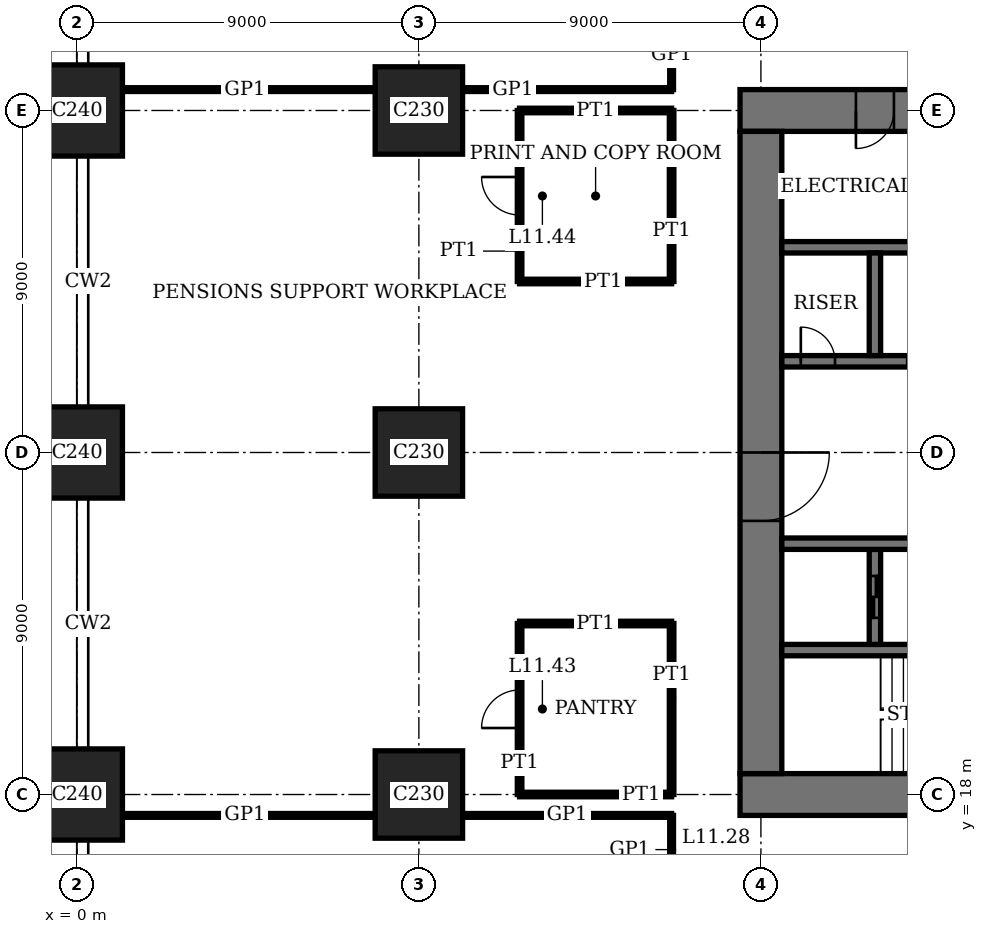
"""IFC4 building model, lengths in metres.
Left out: names, types, materials, properties, quantities, classifications, styles, units other than length and angle.
Written with IfcOpenShell. Run it as: python <this file> out.ifc"""

import sys

from ifc_helpers import new_model, si_unit, direction, frame, frame_2d, origin, origin_2d, place, context, subcontext, project, spatial, rectangle, extrude, element, fill, save


model = new_model("IFC4")
c1 = context("Model", 3, precision=1e-05, world=origin(), true_north=direction((0.0, 1.0)))
c2 = subcontext(c1, "Body", "Model", "MODEL_VIEW")
j1 = project(units=[si_unit("LENGTHUNIT", "METRE"), si_unit("PLANEANGLEUNIT", "RADIAN")], contexts=[c1])
p1 = place(None, origin())
s1 = spatial("IfcSite", under=j1, at=p1, CompositionType="ELEMENT")
p2 = place(p1, origin())
s2 = spatial("IfcBuilding", under=s1, at=p2, CompositionType="ELEMENT")
p3 = place(p2, frame((0.0, 0.0, 47.8)))
s3 = spatial("IfcBuildingStorey", under=s2, at=p3, CompositionType="ELEMENT", Elevation=47.8)
for number, where, z_axis, x_axis in (
    (1, (0.0, 18.0, 0.0), (0.0, 0.0, 1.0), (1.0, 0.0, 0.0)),
    (2, (0.0, 27.0, 0.0), (0.0, 0.0, 1.0), (1.0, 0.0, 0.0)),
    (3, (0.0, 36.0, 0.0), (0.0, 0.0, 1.0), (1.0, 0.0, 0.0)),
):
    element("IfcColumn", number, at=place(p3, frame(where, z_axis=z_axis, x_axis=x_axis)), inside=s3, PredefinedType="COLUMN", context=c2, shape_type="SweptSolid", body=[
        extrude(rectangle(XDim=2.4, YDim=2.4, at=origin_2d()), origin(), (0.0, 0.0, 1.0), 4.0),
    ])
for number, where, z_axis, x_axis in (
    (4, (9.0, 18.0, 0.0), (0.0, 0.0, 1.0), (1.0, 0.0, 0.0)),
    (5, (9.0, 27.0, 0.0), (0.0, 0.0, 1.0), (1.0, 0.0, 0.0)),
    (6, (9.0, 36.0, 0.0), (0.0, 0.0, 1.0), (1.0, 0.0, 0.0)),
):
    element("IfcColumn", number, at=place(p3, frame(where, z_axis=z_axis, x_axis=x_axis)), inside=s3, PredefinedType="COLUMN", context=c2, shape_type="SweptSolid", body=[
        extrude(rectangle(XDim=2.3, YDim=2.3, at=origin_2d()), origin(), (0.0, 0.0, 1.0), 4.0),
    ])
p4 = place(p3, frame((17.45, 18.0, 0.0), z_axis=(0.0, 0.0, 1.0), x_axis=(1.0, 0.0, 0.0)))
e7 = element("IfcWall", 7, at=p4, inside=s3, PredefinedType="SHEAR", context=c2, shape_type="SweptSolid", body=[
    extrude(rectangle(XDim=28.1, YDim=1.1, at=frame_2d((14.05, 0.0))), origin(), (0.0, 0.0, 1.0), 4.0),
])
p5 = place(p4, frame((11.55, 0.0, 0.0)))
e8 = element("IfcOpeningElement", 8, at=p5, cuts=e7, PredefinedType="OPENING", context=c2, shape_type="SweptSolid", body=[
    extrude(rectangle(XDim=1.0, YDim=2.4, at=frame_2d((0.5, 1.2))), frame((0.0, 0.56, 0.0), z_axis=(0.0, -1.0, 0.0), x_axis=(1.0, 0.0, 0.0)), (0.0, 0.0, 1.0), 1.12),
])
p6 = place(p4, frame((16.55, 0.0, 0.0)))
e9 = element("IfcOpeningElement", 9, at=p6, cuts=e7, PredefinedType="OPENING", context=c2, shape_type="SweptSolid", body=[
    extrude(rectangle(XDim=1.0, YDim=2.4, at=frame_2d((0.5, 1.2))), frame((0.0, 0.56, 0.0), z_axis=(0.0, -1.0, 0.0), x_axis=(1.0, 0.0, 0.0)), (0.0, 0.0, 1.0), 1.12),
])
p7 = place(p4, frame((20.0, 0.0, 0.0)))
e10 = element("IfcOpeningElement", 10, at=p7, cuts=e7, PredefinedType="OPENING", context=c2, shape_type="SweptSolid", body=[
    extrude(rectangle(XDim=1.1, YDim=2.4, at=frame_2d((0.55, 1.2))), frame((0.0, 0.56, 0.0), z_axis=(0.0, -1.0, 0.0), x_axis=(1.0, 0.0, 0.0)), (0.0, 0.0, 1.0), 1.12),
])
p8 = place(p4, frame((24.05, 0.0, 0.0)))
e11 = element("IfcOpeningElement", 11, at=p8, cuts=e7, PredefinedType="OPENING", context=c2, shape_type="SweptSolid", body=[
    extrude(rectangle(XDim=1.0, YDim=2.4, at=frame_2d((0.5, 1.2))), frame((0.0, 0.56, 0.0), z_axis=(0.0, -1.0, 0.0), x_axis=(1.0, 0.0, 0.0)), (0.0, 0.0, 1.0), 1.12),
])
p9 = place(p3, frame((45.55, 36.0, 0.0), z_axis=(0.0, 0.0, 1.0), x_axis=(-1.0, 0.0, 0.0)))
e12 = element("IfcWall", 12, at=p9, inside=s3, PredefinedType="SHEAR", context=c2, shape_type="SweptSolid", body=[
    extrude(rectangle(XDim=28.1, YDim=1.1, at=frame_2d((14.05, 0.0))), origin(), (0.0, 0.0, 1.0), 4.0),
])
p10 = place(p9, frame((11.55, 0.0, 0.0)))
e13 = element("IfcOpeningElement", 13, at=p10, cuts=e12, PredefinedType="OPENING", context=c2, shape_type="SweptSolid", body=[
    extrude(rectangle(XDim=1.0, YDim=2.4, at=frame_2d((0.5, 1.2))), frame((0.0, 0.56, 0.0), z_axis=(0.0, -1.0, 0.0), x_axis=(1.0, 0.0, 0.0)), (0.0, 0.0, 1.0), 1.12),
])
p11 = place(p9, frame((16.55, 0.0, 0.0)))
e14 = element("IfcOpeningElement", 14, at=p11, cuts=e12, PredefinedType="OPENING", context=c2, shape_type="SweptSolid", body=[
    extrude(rectangle(XDim=1.0, YDim=2.4, at=frame_2d((0.5, 1.2))), frame((0.0, 0.56, 0.0), z_axis=(0.0, -1.0, 0.0), x_axis=(1.0, 0.0, 0.0)), (0.0, 0.0, 1.0), 1.12),
])
p12 = place(p9, frame((20.0, 0.0, 0.0)))
e15 = element("IfcOpeningElement", 15, at=p12, cuts=e12, PredefinedType="OPENING", context=c2, shape_type="SweptSolid", body=[
    extrude(rectangle(XDim=1.1, YDim=2.4, at=frame_2d((0.55, 1.2))), frame((0.0, 0.56, 0.0), z_axis=(0.0, -1.0, 0.0), x_axis=(1.0, 0.0, 0.0)), (0.0, 0.0, 1.0), 1.12),
])
p13 = place(p9, frame((24.05, 0.0, 0.0)))
e16 = element("IfcOpeningElement", 16, at=p13, cuts=e12, PredefinedType="OPENING", context=c2, shape_type="SweptSolid", body=[
    extrude(rectangle(XDim=1.0, YDim=2.4, at=frame_2d((0.5, 1.2))), frame((0.0, 0.56, 0.0), z_axis=(0.0, -1.0, 0.0), x_axis=(1.0, 0.0, 0.0)), (0.0, 0.0, 1.0), 1.12),
])
p14 = place(p3, frame((18.0, 35.45, 0.0), z_axis=(0.0, 0.0, 1.0), x_axis=(0.0, -1.0, 0.0)))
e17 = element("IfcWall", 17, at=p14, inside=s3, PredefinedType="SHEAR", context=c2, shape_type="SweptSolid", body=[
    extrude(rectangle(XDim=16.9, YDim=1.1, at=frame_2d((8.45, 0.0))), origin(), (0.0, 0.0, 1.0), 4.0),
])
p15 = place(p14, frame((8.45, 0.0, 0.0)))
e18 = element("IfcOpeningElement", 18, at=p15, cuts=e17, PredefinedType="OPENING", context=c2, shape_type="SweptSolid", body=[
    extrude(rectangle(XDim=1.8, YDim=2.4, at=frame_2d((0.9, 1.2))), frame((0.0, 0.56, 0.0), z_axis=(0.0, -1.0, 0.0), x_axis=(1.0, 0.0, 0.0)), (0.0, 0.0, 1.0), 1.12),
])
p16 = place(p3, frame((18.55, 21.8, 0.0), z_axis=(0.0, 0.0, 1.0), x_axis=(1.0, 0.0, 0.0)))
e19 = element("IfcWall", 19, at=p16, inside=s3, PredefinedType="SHEAR", context=c2, shape_type="SweptSolid", body=[
    extrude(rectangle(XDim=8.3, YDim=0.3, at=frame_2d((4.15, 0.0))), origin(), (0.0, 0.0, 1.0), 4.0),
])
p17 = place(p16, frame((6.85, 0.0, 0.0)))
e20 = element("IfcOpeningElement", 20, at=p17, cuts=e19, PredefinedType="OPENING", context=c2, shape_type="SweptSolid", body=[
    extrude(rectangle(XDim=1.0, YDim=2.4, at=frame_2d((0.5, 1.2))), frame((0.0, 0.16, 0.0), z_axis=(0.0, -1.0, 0.0), x_axis=(1.0, 0.0, 0.0)), (0.0, 0.0, 1.0), 0.32),
])
p18 = place(p3, frame((21.0, 21.95, 0.0), z_axis=(0.0, 0.0, 1.0), x_axis=(0.0, 1.0, 0.0)))
e21 = element("IfcWall", 21, at=p18, inside=s3, PredefinedType="SHEAR", context=c2, shape_type="SweptSolid", body=[
    extrude(rectangle(XDim=2.5, YDim=0.3, at=frame_2d((1.25, 0.0))), origin(), (0.0, 0.0, 1.0), 4.0),
])
p19 = place(p18, frame((0.7, 0.0, 0.0)))
e22 = element("IfcOpeningElement", 22, at=p19, cuts=e21, PredefinedType="OPENING", context=c2, shape_type="SweptSolid", body=[
    extrude(rectangle(XDim=1.1, YDim=2.4, at=frame_2d((0.55, 1.2))), frame((0.0, 0.16, 0.0), z_axis=(0.0, -1.0, 0.0), x_axis=(1.0, 0.0, 0.0)), (0.0, 0.0, 1.0), 0.32),
])
p20 = place(p3, frame((18.55, 24.6, 0.0), z_axis=(0.0, 0.0, 1.0), x_axis=(1.0, 0.0, 0.0)))
e23 = element("IfcWall", 23, at=p20, inside=s3, PredefinedType="SHEAR", context=c2, shape_type="SweptSolid", body=[
    extrude(rectangle(XDim=25.9, YDim=0.3, at=frame_2d((12.95, 0.0))), origin(), (0.0, 0.0, 1.0), 4.0),
])
p21 = place(p20, frame((4.95, 0.0, 0.0)))
e24 = element("IfcOpeningElement", 24, at=p21, cuts=e23, PredefinedType="OPENING", context=c2, shape_type="SweptSolid", body=[
    extrude(rectangle(XDim=1.0, YDim=2.4, at=frame_2d((0.5, 1.2))), frame((0.0, 0.16, 0.0), z_axis=(0.0, -1.0, 0.0), x_axis=(1.0, 0.0, 0.0)), (0.0, 0.0, 1.0), 0.32),
])
p22 = place(p20, frame((24.5, 0.0, 0.0)))
e25 = element("IfcOpeningElement", 25, at=p22, cuts=e23, PredefinedType="OPENING", context=c2, shape_type="SweptSolid", body=[
    extrude(rectangle(XDim=0.9, YDim=2.1, at=frame_2d((0.45, 1.05))), frame((0.0, 0.16, 0.0), z_axis=(0.0, -1.0, 0.0), x_axis=(1.0, 0.0, 0.0)), (0.0, 0.0, 1.0), 0.32),
])
p23 = place(p20, frame((9.4, 0.0, 0.0)))
e26 = element("IfcOpeningElement", 26, at=p23, cuts=e23, PredefinedType="OPENING", context=c2, shape_type="SweptSolid", body=[
    extrude(rectangle(XDim=1.1, YDim=2.4, at=frame_2d((0.55, 1.2))), frame((0.0, 0.16, 0.0), z_axis=(0.0, -1.0, 0.0), x_axis=(1.0, 0.0, 0.0)), (0.0, 0.0, 1.0), 0.32),
])
p24 = place(p20, frame((12.4, 0.0, 0.0)))
e27 = element("IfcOpeningElement", 27, at=p24, cuts=e23, PredefinedType="OPENING", context=c2, shape_type="SweptSolid", body=[
    extrude(rectangle(XDim=1.1, YDim=2.4, at=frame_2d((0.55, 1.2))), frame((0.0, 0.16, 0.0), z_axis=(0.0, -1.0, 0.0), x_axis=(1.0, 0.0, 0.0)), (0.0, 0.0, 1.0), 0.32),
])
p25 = place(p20, frame((15.4, 0.0, 0.0)))
e28 = element("IfcOpeningElement", 28, at=p25, cuts=e23, PredefinedType="OPENING", context=c2, shape_type="SweptSolid", body=[
    extrude(rectangle(XDim=1.1, YDim=2.4, at=frame_2d((0.55, 1.2))), frame((0.0, 0.16, 0.0), z_axis=(0.0, -1.0, 0.0), x_axis=(1.0, 0.0, 0.0)), (0.0, 0.0, 1.0), 0.32),
])
p26 = place(p20, frame((18.4, 0.0, 0.0)))
e29 = element("IfcOpeningElement", 29, at=p26, cuts=e23, PredefinedType="OPENING", context=c2, shape_type="SweptSolid", body=[
    extrude(rectangle(XDim=1.1, YDim=2.4, at=frame_2d((0.55, 1.2))), frame((0.0, 0.16, 0.0), z_axis=(0.0, -1.0, 0.0), x_axis=(1.0, 0.0, 0.0)), (0.0, 0.0, 1.0), 0.32),
])
p27 = place(p20, frame((21.3, 0.0, 0.0)))
e30 = element("IfcOpeningElement", 30, at=p27, cuts=e23, PredefinedType="OPENING", context=c2, shape_type="SweptSolid", body=[
    extrude(rectangle(XDim=1.3, YDim=2.4, at=frame_2d((0.65, 1.2))), frame((0.0, 0.16, 0.0), z_axis=(0.0, -1.0, 0.0), x_axis=(1.0, 0.0, 0.0)), (0.0, 0.0, 1.0), 0.32),
])
p28 = place(p3, frame((18.55, 29.4, 0.0), z_axis=(0.0, 0.0, 1.0), x_axis=(1.0, 0.0, 0.0)))
e31 = element("IfcWall", 31, at=p28, inside=s3, PredefinedType="SHEAR", context=c2, shape_type="SweptSolid", body=[
    extrude(rectangle(XDim=25.9, YDim=0.3, at=frame_2d((12.95, 0.0))), origin(), (0.0, 0.0, 1.0), 4.0),
])
p29 = place(p28, frame((19.95, 0.0, 0.0)))
e32 = element("IfcOpeningElement", 32, at=p29, cuts=e31, PredefinedType="OPENING", context=c2, shape_type="SweptSolid", body=[
    extrude(rectangle(XDim=1.0, YDim=2.4, at=frame_2d((0.5, 1.2))), frame((0.0, 0.16, 0.0), z_axis=(0.0, -1.0, 0.0), x_axis=(1.0, 0.0, 0.0)), (0.0, 0.0, 1.0), 0.32),
])
p30 = place(p28, frame((0.5, 0.0, 0.0)))
e33 = element("IfcOpeningElement", 33, at=p30, cuts=e31, PredefinedType="OPENING", context=c2, shape_type="SweptSolid", body=[
    extrude(rectangle(XDim=0.9, YDim=2.1, at=frame_2d((0.45, 1.05))), frame((0.0, 0.16, 0.0), z_axis=(0.0, -1.0, 0.0), x_axis=(1.0, 0.0, 0.0)), (0.0, 0.0, 1.0), 0.32),
])
p31 = place(p28, frame((3.3, 0.0, 0.0)))
e34 = element("IfcOpeningElement", 34, at=p31, cuts=e31, PredefinedType="OPENING", context=c2, shape_type="SweptSolid", body=[
    extrude(rectangle(XDim=1.3, YDim=2.4, at=frame_2d((0.65, 1.2))), frame((0.0, 0.16, 0.0), z_axis=(0.0, -1.0, 0.0), x_axis=(1.0, 0.0, 0.0)), (0.0, 0.0, 1.0), 0.32),
])
p32 = place(p3, frame((18.55, 32.4, 0.0), z_axis=(0.0, 0.0, 1.0), x_axis=(1.0, 0.0, 0.0)))
e35 = element("IfcWall", 35, at=p32, inside=s3, PredefinedType="SHEAR", context=c2, shape_type="SweptSolid", body=[
    extrude(rectangle(XDim=17.3, YDim=0.3, at=frame_2d((8.65, 0.0))), origin(), (0.0, 0.0, 1.0), 4.0),
])
p33 = place(p3, frame((21.0, 29.55, 0.0), z_axis=(0.0, 0.0, 1.0), x_axis=(0.0, 1.0, 0.0)))
e36 = element("IfcWall", 36, at=p33, inside=s3, PredefinedType="SHEAR", context=c2, shape_type="SweptSolid", body=[
    extrude(rectangle(XDim=2.7, YDim=0.3, at=frame_2d((1.35, 0.0))), origin(), (0.0, 0.0, 1.0), 4.0),
])
p34 = place(p3, frame((1.2, 17.45, 0.0), z_axis=(0.0, 0.0, 1.0), x_axis=(1.0, 0.0, 0.0)))
e37 = element("IfcWall", 37, at=p34, inside=s3, PredefinedType="PARTITIONING", context=c2, shape_type="SweptSolid", body=[
    extrude(rectangle(XDim=6.65, YDim=0.1, at=frame_2d((3.325, 0.0))), origin(), (0.0, 0.0, 1.0), 3.75),
])
p35 = place(p3, frame((10.15, 17.45, 0.0), z_axis=(0.0, 0.0, 1.0), x_axis=(1.0, 0.0, 0.0)))
e38 = element("IfcWall", 38, at=p35, inside=s3, PredefinedType="PARTITIONING", context=c2, shape_type="SweptSolid", body=[
    extrude(rectangle(XDim=5.5, YDim=0.1, at=frame_2d((2.75, 0.0))), origin(), (0.0, 0.0, 1.0), 3.75),
])
p36 = place(p3, frame((11.65, 18.0, 0.0), z_axis=(0.0, 0.0, 1.0), x_axis=(1.0, 0.0, 0.0)))
e39 = element("IfcWall", 39, at=p36, inside=s3, PredefinedType="PARTITIONING", context=c2, shape_type="SweptSolid", body=[
    extrude(rectangle(XDim=4.0, YDim=0.12, at=frame_2d((2.0, 0.0))), origin(), (0.0, 0.0, 1.0), 3.05),
])
for number, where, z_axis, x_axis in (
    (40, (11.65, 22.5, 0.0), (0.0, 0.0, 1.0), (1.0, 0.0, 0.0)),
    (41, (11.65, 31.5, 0.0), (0.0, 0.0, 1.0), (1.0, 0.0, 0.0)),
):
    element("IfcWall", number, at=place(p3, frame(where, z_axis=z_axis, x_axis=x_axis)), inside=s3, PredefinedType="PARTITIONING", context=c2, shape_type="SweptSolid", body=[
        extrude(rectangle(XDim=4.0, YDim=0.12, at=frame_2d((2.0, 0.0))), origin(), (0.0, 0.0, 1.0), 3.1),
    ])
p37 = place(p3, frame((11.65, 36.0, 0.0), z_axis=(0.0, 0.0, 1.0), x_axis=(1.0, 0.0, 0.0)))
e42 = element("IfcWall", 42, at=p37, inside=s3, PredefinedType="PARTITIONING", context=c2, shape_type="SweptSolid", body=[
    extrude(rectangle(XDim=4.0, YDim=0.12, at=frame_2d((2.0, 0.0))), origin(), (0.0, 0.0, 1.0), 3.05),
])
p38 = place(p3, frame((1.2, 36.55, 0.0), z_axis=(0.0, 0.0, 1.0), x_axis=(1.0, 0.0, 0.0)))
e43 = element("IfcWall", 43, at=p38, inside=s3, PredefinedType="PARTITIONING", context=c2, shape_type="SweptSolid", body=[
    extrude(rectangle(XDim=6.65, YDim=0.1, at=frame_2d((3.325, 0.0))), origin(), (0.0, 0.0, 1.0), 3.75),
])
p39 = place(p3, frame((10.15, 36.55, 0.0), z_axis=(0.0, 0.0, 1.0), x_axis=(1.0, 0.0, 0.0)))
e44 = element("IfcWall", 44, at=p39, inside=s3, PredefinedType="PARTITIONING", context=c2, shape_type="SweptSolid", body=[
    extrude(rectangle(XDim=5.5, YDim=0.1, at=frame_2d((2.75, 0.0))), origin(), (0.0, 0.0, 1.0), 3.75),
])
p40 = place(p3, frame((11.65, 18.0, 0.0), z_axis=(0.0, 0.0, 1.0), x_axis=(0.0, 1.0, 0.0)))
e45 = element("IfcWall", 45, at=p40, inside=s3, PredefinedType="PARTITIONING", context=c2, shape_type="SweptSolid", body=[
    extrude(rectangle(XDim=4.5, YDim=0.12, at=frame_2d((2.25, 0.0))), origin(), (0.0, 0.0, 1.0), 3.75),
])
p41 = place(p40, frame((1.75, 0.0, 0.0)))
e46 = element("IfcOpeningElement", 46, at=p41, cuts=e45, PredefinedType="OPENING", context=c2, shape_type="SweptSolid", body=[
    extrude(rectangle(XDim=1.0, YDim=2.4, at=frame_2d((0.5, 1.2))), frame((0.0, 0.07, 0.0), z_axis=(0.0, -1.0, 0.0), x_axis=(1.0, 0.0, 0.0)), (0.0, 0.0, 1.0), 0.14),
])
p42 = place(p3, frame((11.65, 31.5, 0.0), z_axis=(0.0, 0.0, 1.0), x_axis=(0.0, 1.0, 0.0)))
e47 = element("IfcWall", 47, at=p42, inside=s3, PredefinedType="PARTITIONING", context=c2, shape_type="SweptSolid", body=[
    extrude(rectangle(XDim=4.5, YDim=0.12, at=frame_2d((2.25, 0.0))), origin(), (0.0, 0.0, 1.0), 3.75),
])
p43 = place(p42, frame((1.75, 0.0, 0.0)))
e48 = element("IfcOpeningElement", 48, at=p43, cuts=e47, PredefinedType="OPENING", context=c2, shape_type="SweptSolid", body=[
    extrude(rectangle(XDim=1.0, YDim=2.4, at=frame_2d((0.5, 1.2))), frame((0.0, 0.07, 0.0), z_axis=(0.0, -1.0, 0.0), x_axis=(1.0, 0.0, 0.0)), (0.0, 0.0, 1.0), 0.14),
])
for number, where, z_axis, x_axis in (
    (49, (15.65, 18.0, 0.0), (0.0, 0.0, 1.0), (0.0, 1.0, 0.0)),
    (50, (15.65, 31.5, 0.0), (0.0, 0.0, 1.0), (0.0, 1.0, 0.0)),
):
    element("IfcWall", number, at=place(p3, frame(where, z_axis=z_axis, x_axis=x_axis)), inside=s3, PredefinedType="PARTITIONING", context=c2, shape_type="SweptSolid", body=[
        extrude(rectangle(XDim=4.5, YDim=0.12, at=frame_2d((2.25, 0.0))), origin(), (0.0, 0.0, 1.0), 3.75),
    ])
for number, where, z_axis, x_axis in (
    (51, (15.65, 15.65, 0.0), (0.0, 0.0, 1.0), (0.0, 1.0, 0.0)),
    (52, (15.65, 36.55, 0.0), (0.0, 0.0, 1.0), (0.0, 1.0, 0.0)),
):
    element("IfcWall", number, at=place(p3, frame(where, z_axis=z_axis, x_axis=x_axis)), inside=s3, PredefinedType="PARTITIONING", context=c2, shape_type="SweptSolid", body=[
        extrude(rectangle(XDim=1.8, YDim=0.1, at=frame_2d((0.9, 0.0))), origin(), (0.0, 0.0, 1.0), 3.75),
    ])
p44 = place(p15, origin())
e53 = element("IfcDoor", 53, at=p44, inside=s3, OperationType="DOUBLE_DOOR_DOUBLE_SWING", PredefinedType="DOOR", context=c2, shape_type="SweptSolid", body=[
    extrude(rectangle(XDim=1.8, YDim=2.4, at=frame_2d((0.9, 1.2))), frame((0.0, 0.03, 0.0), z_axis=(0.0, -1.0, 0.0), x_axis=(1.0, 0.0, 0.0)), (0.0, 0.0, 1.0), 0.06),
    extrude(rectangle(XDim=0.04, YDim=2.4, at=frame_2d((0.02, 1.2))), frame((0.0, 0.55, 0.0), z_axis=(0.0, -1.0, 0.0), x_axis=(1.0, 0.0, 0.0)), (0.0, 0.0, 1.0), 1.1),
    extrude(rectangle(XDim=0.04, YDim=2.4, at=frame_2d((1.78, 1.2))), frame((0.0, 0.55, 0.0), z_axis=(0.0, -1.0, 0.0), x_axis=(1.0, 0.0, 0.0)), (0.0, 0.0, 1.0), 1.1),
    extrude(rectangle(XDim=1.8, YDim=0.04, at=frame_2d((0.9, 2.38))), frame((0.0, 0.55, 0.0), z_axis=(0.0, -1.0, 0.0), x_axis=(1.0, 0.0, 0.0)), (0.0, 0.0, 1.0), 1.1),
])
fill(e18, e53)
p45 = place(p13, origin())
e54 = element("IfcDoor", 54, at=p45, inside=s3, OperationType="SINGLE_SWING_LEFT", PredefinedType="DOOR", context=c2, shape_type="SweptSolid", body=[
    extrude(rectangle(XDim=1.0, YDim=2.4, at=frame_2d((0.5, 1.2))), frame((0.0, 0.025, 0.0), z_axis=(0.0, -1.0, 0.0), x_axis=(1.0, 0.0, 0.0)), (0.0, 0.0, 1.0), 0.05),
    extrude(rectangle(XDim=0.04, YDim=2.4, at=frame_2d((0.02, 1.2))), frame((0.0, 0.4, 0.0), z_axis=(0.0, -1.0, 0.0), x_axis=(1.0, 0.0, 0.0)), (0.0, 0.0, 1.0), 0.8),
    extrude(rectangle(XDim=0.04, YDim=2.4, at=frame_2d((0.98, 1.2))), frame((0.0, 0.4, 0.0), z_axis=(0.0, -1.0, 0.0), x_axis=(1.0, 0.0, 0.0)), (0.0, 0.0, 1.0), 0.8),
    extrude(rectangle(XDim=1.0, YDim=0.04, at=frame_2d((0.5, 2.38))), frame((0.0, 0.4, 0.0), z_axis=(0.0, -1.0, 0.0), x_axis=(1.0, 0.0, 0.0)), (0.0, 0.0, 1.0), 0.8),
])
fill(e16, e54)
p46 = place(p30, origin())
e55 = element("IfcDoor", 55, at=p46, inside=s3, OperationType="SINGLE_SWING_RIGHT", PredefinedType="DOOR", context=c2, shape_type="SweptSolid", body=[
    extrude(rectangle(XDim=0.9, YDim=2.1, at=frame_2d((0.45, 1.05))), frame((0.0, 0.03, 0.0), z_axis=(0.0, -1.0, 0.0), x_axis=(1.0, 0.0, 0.0)), (0.0, 0.0, 1.0), 0.06),
])
fill(e33, e55)
p47 = place(p41, origin())
e56 = element("IfcDoor", 56, at=p47, inside=s3, OperationType="SINGLE_SWING_RIGHT", PredefinedType="DOOR", context=c2, shape_type="SweptSolid", body=[
    extrude(rectangle(XDim=1.0, YDim=2.4, at=frame_2d((0.5, 1.2))), frame((0.0, 0.025, 0.0), z_axis=(0.0, -1.0, 0.0), x_axis=(1.0, 0.0, 0.0)), (0.0, 0.0, 1.0), 0.05),
])
fill(e46, e56)
p48 = place(p43, origin())
e57 = element("IfcDoor", 57, at=p48, inside=s3, OperationType="SINGLE_SWING_LEFT", PredefinedType="DOOR", context=c2, shape_type="SweptSolid", body=[
    extrude(rectangle(XDim=1.0, YDim=2.4, at=frame_2d((0.5, 1.2))), frame((0.0, 0.025, 0.0), z_axis=(0.0, -1.0, 0.0), x_axis=(1.0, 0.0, 0.0)), (0.0, 0.0, 1.0), 0.05),
])
fill(e48, e57)
p49 = place(p31, origin())
e58 = element("IfcDoor", 58, at=p49, inside=s3, OperationType="DOUBLE_DOOR_SLIDING", PredefinedType="DOOR", context=c2, shape_type="SweptSolid", body=[
    extrude(rectangle(XDim=1.3, YDim=2.4, at=frame_2d((0.65, 1.2))), frame((0.0, 0.02, 0.0), z_axis=(0.0, -1.0, 0.0), x_axis=(1.0, 0.0, 0.0)), (0.0, 0.0, 1.0), 0.04),
])
fill(e34, e58)
p50 = place(p19, origin())
e59 = element("IfcDoor", 59, at=p50, inside=s3, OperationType="DOUBLE_DOOR_SLIDING", PredefinedType="DOOR", context=c2, shape_type="SweptSolid", body=[
    extrude(rectangle(XDim=1.1, YDim=2.4, at=frame_2d((0.55, 1.2))), frame((0.0, 0.03, 0.0), z_axis=(0.0, -1.0, 0.0), x_axis=(1.0, 0.0, 0.0)), (0.0, 0.0, 1.0), 0.06),
])
fill(e22, e59)
save(model, sys.argv[1])
